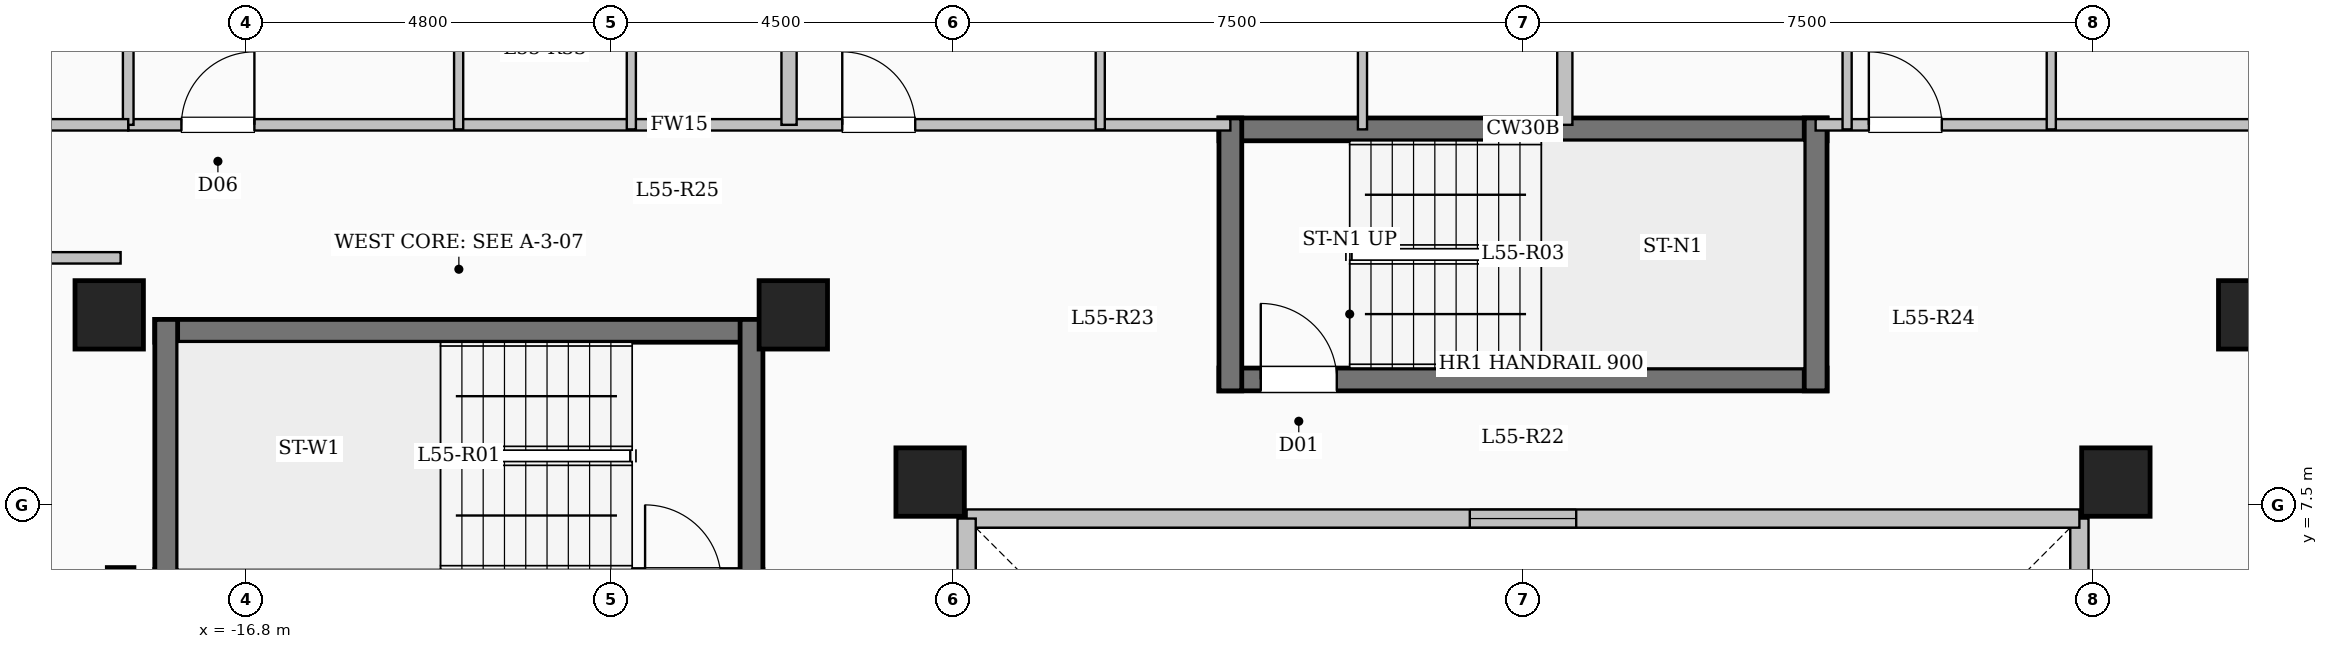
"""IFC4 building model, lengths in metres.
Left out: names, types, materials, properties, quantities, classifications, styles, units other than length and angle.
Written with IfcOpenShell. Run it as: python <this file> out.ifc"""

import sys

from ifc_helpers import new_model, si_unit, direction, frame, frame_2d, origin, origin_2d, place, context, subcontext, project, spatial, rectangle, extrude, element, fill, save


model = new_model("IFC4")
c1 = context("Model", 3, precision=1e-05, world=origin(), true_north=direction((0.0, 1.0)))
c2 = subcontext(c1, "Body", "Model", "MODEL_VIEW")
j1 = project(units=[si_unit("LENGTHUNIT", "METRE"), si_unit("PLANEANGLEUNIT", "RADIAN")], contexts=[c1])
p1 = place(None, origin())
s1 = spatial("IfcSite", under=j1, at=p1, CompositionType="ELEMENT")
p2 = place(p1, origin())
s2 = spatial("IfcBuilding", under=s1, at=p2, CompositionType="ELEMENT")
p3 = place(p2, frame((0.0, 0.0, 203.65)))
s3 = spatial("IfcBuildingStorey", under=s2, at=p3, CompositionType="ELEMENT", Elevation=203.65)
for number, where, z_axis, x_axis in (
    (1, (-7.8, 7.8, 0.0), (0.0, 0.0, 1.0), (1.0, 0.0, 0.0)),
    (2, (7.8, 7.8, 0.0), (0.0, 0.0, 1.0), (1.0, 0.0, 0.0)),
    (3, (-9.6, 10.0, 0.0), (0.0, 0.0, 1.0), (1.0, 0.0, 0.0)),
    (4, (9.6, 10.0, 0.0), (0.0, 0.0, 1.0), (1.0, 0.0, 0.0)),
    (5, (-18.6, 10.0, 0.0), (0.0, 0.0, 1.0), (1.0, 0.0, 0.0)),
):
    element("IfcColumn", number, at=place(p3, frame(where, z_axis=z_axis, x_axis=x_axis)), inside=s3, PredefinedType="COLUMN", context=c2, shape_type="SweptSolid", body=[
        extrude(rectangle(XDim=0.9, YDim=0.9, at=origin_2d()), origin(), (0.0, 0.0, 1.0), 3.35),
    ])
p4 = place(p3, frame((7.32, -7.32, 0.0), z_axis=(0.0, 0.0, 1.0), x_axis=(0.0, 1.0, 0.0)))
e6 = element("IfcWall", 6, at=p4, inside=s3, PredefinedType="SOLIDWALL", context=c2, shape_type="SweptSolid", body=[
    extrude(rectangle(XDim=14.64, YDim=0.24, at=frame_2d((7.32, 0.0))), origin(), (0.0, 0.0, 1.0), 3.1),
])
p5 = place(p4, frame((6.62, 0.0, 0.95)))
e7 = element("IfcOpeningElement", 7, at=p5, cuts=e6, PredefinedType="OPENING", context=c2, shape_type="SweptSolid", body=[
    extrude(rectangle(XDim=1.4, YDim=1.5, at=frame_2d((0.7, 0.75))), frame((0.0, 0.13, 0.0), z_axis=(0.0, -1.0, 0.0), x_axis=(1.0, 0.0, 0.0)), (0.0, 0.0, 1.0), 0.26),
])
p6 = place(p3, frame((7.32, 7.32, 0.0), z_axis=(0.0, 0.0, 1.0), x_axis=(-1.0, 0.0, 0.0)))
e8 = element("IfcWall", 8, at=p6, inside=s3, PredefinedType="SOLIDWALL", context=c2, shape_type="SweptSolid", body=[
    extrude(rectangle(XDim=14.64, YDim=0.24, at=frame_2d((7.32, 0.0))), origin(), (0.0, 0.0, 1.0), 3.1),
])
p7 = place(p6, frame((6.62, 0.0, 0.95)))
e9 = element("IfcOpeningElement", 9, at=p7, cuts=e8, PredefinedType="OPENING", context=c2, shape_type="SweptSolid", body=[
    extrude(rectangle(XDim=1.4, YDim=1.5, at=frame_2d((0.7, 0.75))), frame((0.0, 0.13, 0.0), z_axis=(0.0, -1.0, 0.0), x_axis=(1.0, 0.0, 0.0)), (0.0, 0.0, 1.0), 0.26),
])
p8 = place(p3, frame((-7.32, 7.32, 0.0), z_axis=(0.0, 0.0, 1.0), x_axis=(0.0, -1.0, 0.0)))
e10 = element("IfcWall", 10, at=p8, inside=s3, PredefinedType="SOLIDWALL", context=c2, shape_type="SweptSolid", body=[
    extrude(rectangle(XDim=14.64, YDim=0.24, at=frame_2d((7.32, 0.0))), origin(), (0.0, 0.0, 1.0), 3.1),
])
p9 = place(p8, frame((6.62, 0.0, 0.95)))
e11 = element("IfcOpeningElement", 11, at=p9, cuts=e10, PredefinedType="OPENING", context=c2, shape_type="SweptSolid", body=[
    extrude(rectangle(XDim=1.4, YDim=1.5, at=frame_2d((0.7, 0.75))), frame((0.0, 0.13, 0.0), z_axis=(0.0, -1.0, 0.0), x_axis=(1.0, 0.0, 0.0)), (0.0, 0.0, 1.0), 0.26),
])
p10 = place(p3, frame((-18.0, 9.79, 0.0), z_axis=(0.0, 0.0, 1.0), x_axis=(1.0, 0.0, 0.0)))
e12 = element("IfcWall", 12, at=p10, inside=s3, PredefinedType="SHEAR", context=c2, shape_type="SweptSolid", body=[
    extrude(rectangle(XDim=8.0, YDim=0.3, at=frame_2d((4.0, 0.0))), origin(), (0.0, 0.0, 1.0), 3.35),
])
p11 = place(p3, frame((-18.0, 6.5, 0.0), z_axis=(0.0, 0.0, 1.0), x_axis=(1.0, 0.0, 0.0)))
e13 = element("IfcWall", 13, at=p11, inside=s3, PredefinedType="SHEAR", context=c2, shape_type="SweptSolid", body=[
    extrude(rectangle(XDim=8.0, YDim=0.3, at=frame_2d((4.0, 0.0))), origin(), (0.0, 0.0, 1.0), 3.35),
])
p12 = place(p11, frame((6.45, 0.0, 0.0)))
e14 = element("IfcOpeningElement", 14, at=p12, cuts=e13, PredefinedType="OPENING", context=c2, shape_type="SweptSolid", body=[
    extrude(rectangle(XDim=1.0, YDim=2.15, at=frame_2d((0.5, 1.075))), frame((0.0, 0.16, 0.0), z_axis=(0.0, -1.0, 0.0), x_axis=(1.0, 0.0, 0.0)), (0.0, 0.0, 1.0), 0.32),
])
for number, where, z_axis, x_axis in (
    (15, (-17.85, 6.35, 0.0), (0.0, 0.0, 1.0), (0.0, 1.0, 0.0)),
    (16, (-10.15, 6.35, 0.0), (0.0, 0.0, 1.0), (0.0, 1.0, 0.0)),
):
    element("IfcWall", number, at=place(p3, frame(where, z_axis=z_axis, x_axis=x_axis)), inside=s3, PredefinedType="SHEAR", context=c2, shape_type="SweptSolid", body=[
        extrude(rectangle(XDim=3.59, YDim=0.3, at=frame_2d((1.795, 0.0))), origin(), (0.0, 0.0, 1.0), 3.35),
    ])
p13 = place(p3, frame((-4.0, 12.44, 0.0), z_axis=(0.0, 0.0, 1.0), x_axis=(1.0, 0.0, 0.0)))
e17 = element("IfcWall", 17, at=p13, inside=s3, PredefinedType="SHEAR", context=c2, shape_type="SweptSolid", body=[
    extrude(rectangle(XDim=8.0, YDim=0.3, at=frame_2d((4.0, 0.0))), origin(), (0.0, 0.0, 1.0), 3.35),
])
p14 = place(p3, frame((-4.0, 9.15, 0.0), z_axis=(0.0, 0.0, 1.0), x_axis=(1.0, 0.0, 0.0)))
e18 = element("IfcWall", 18, at=p14, inside=s3, PredefinedType="SHEAR", context=c2, shape_type="SweptSolid", body=[
    extrude(rectangle(XDim=8.0, YDim=0.3, at=frame_2d((4.0, 0.0))), origin(), (0.0, 0.0, 1.0), 3.35),
])
p15 = place(p14, frame((0.55, 0.0, 0.0)))
e19 = element("IfcOpeningElement", 19, at=p15, cuts=e18, PredefinedType="OPENING", context=c2, shape_type="SweptSolid", body=[
    extrude(rectangle(XDim=1.0, YDim=2.15, at=frame_2d((0.5, 1.075))), frame((0.0, 0.16, 0.0), z_axis=(0.0, -1.0, 0.0), x_axis=(1.0, 0.0, 0.0)), (0.0, 0.0, 1.0), 0.32),
])
for number, where, z_axis, x_axis in (
    (20, (-3.85, 9.0, 0.0), (0.0, 0.0, 1.0), (0.0, 1.0, 0.0)),
    (21, (3.85, 9.0, 0.0), (0.0, 0.0, 1.0), (0.0, 1.0, 0.0)),
):
    element("IfcWall", number, at=place(p3, frame(where, z_axis=z_axis, x_axis=x_axis)), inside=s3, PredefinedType="SHEAR", context=c2, shape_type="SweptSolid", body=[
        extrude(rectangle(XDim=3.59, YDim=0.3, at=frame_2d((1.795, 0.0))), origin(), (0.0, 0.0, 1.0), 3.35),
    ])
p16 = place(p3, frame((-18.45, -7.375, 0.0), z_axis=(0.0, 0.0, 1.0), x_axis=(0.0, 1.0, 0.0)))
e22 = element("IfcWall", 22, at=p16, inside=s3, PredefinedType="SHEAR", context=c2, shape_type="SweptSolid", body=[
    extrude(rectangle(XDim=14.05, YDim=0.35, at=frame_2d((7.025, 0.0))), origin(), (0.0, 0.0, 1.0), 3.35),
])
p17 = place(p3, frame((-18.35, 12.5, 0.0), z_axis=(0.0, 0.0, 1.0), x_axis=(1.0, 0.0, 0.0)))
e23 = element("IfcWall", 23, at=p17, inside=s3, PredefinedType="PARTITIONING", context=c2, shape_type="SweptSolid", body=[
    extrude(rectangle(XDim=14.5, YDim=0.15, at=frame_2d((7.25, 0.0))), origin(), (0.0, 0.0, 1.0), 3.1),
])
p18 = place(p17, frame((0.7, 0.0, 0.0)))
e24 = element("IfcOpeningElement", 24, at=p18, cuts=e23, PredefinedType="OPENING", context=c2, shape_type="SweptSolid", body=[
    extrude(rectangle(XDim=0.96, YDim=2.15, at=frame_2d((0.48, 1.075))), frame((0.0, 0.085, 0.0), z_axis=(0.0, -1.0, 0.0), x_axis=(1.0, 0.0, 0.0)), (0.0, 0.0, 1.0), 0.17),
])
p19 = place(p17, frame((9.394, 0.0, 0.0)))
e25 = element("IfcOpeningElement", 25, at=p19, cuts=e23, PredefinedType="OPENING", context=c2, shape_type="SweptSolid", body=[
    extrude(rectangle(XDim=0.96, YDim=2.15, at=frame_2d((0.48, 1.075))), frame((0.0, 0.085, 0.0), z_axis=(0.0, -1.0, 0.0), x_axis=(1.0, 0.0, 0.0)), (0.0, 0.0, 1.0), 0.17),
])
p20 = place(p3, frame((3.85, 12.5, 0.0), z_axis=(0.0, 0.0, 1.0), x_axis=(1.0, 0.0, 0.0)))
e26 = element("IfcWall", 26, at=p20, inside=s3, PredefinedType="PARTITIONING", context=c2, shape_type="SweptSolid", body=[
    extrude(rectangle(XDim=14.5, YDim=0.15, at=frame_2d((7.25, 0.0))), origin(), (0.0, 0.0, 1.0), 3.1),
])
p21 = place(p20, frame((0.7, 0.0, 0.0)))
e27 = element("IfcOpeningElement", 27, at=p21, cuts=e26, PredefinedType="OPENING", context=c2, shape_type="SweptSolid", body=[
    extrude(rectangle(XDim=0.96, YDim=2.15, at=frame_2d((0.48, 1.075))), frame((0.0, 0.085, 0.0), z_axis=(0.0, -1.0, 0.0), x_axis=(1.0, 0.0, 0.0)), (0.0, 0.0, 1.0), 0.17),
])
p22 = place(p20, frame((6.656, 0.0, 0.0)))
e28 = element("IfcOpeningElement", 28, at=p22, cuts=e26, PredefinedType="OPENING", context=c2, shape_type="SweptSolid", body=[
    extrude(rectangle(XDim=0.96, YDim=2.15, at=frame_2d((0.48, 1.075))), frame((0.0, 0.085, 0.0), z_axis=(0.0, -1.0, 0.0), x_axis=(1.0, 0.0, 0.0)), (0.0, 0.0, 1.0), 0.17),
])
p23 = place(p3, frame((0.55, 12.5, 0.0), z_axis=(0.0, 0.0, 1.0), x_axis=(0.0, 1.0, 0.0)))
e29 = element("IfcWall", 29, at=p23, inside=s3, PredefinedType="SOLIDWALL", context=c2, shape_type="SweptSolid", body=[
    extrude(rectangle(XDim=9.88, YDim=0.2, at=frame_2d((4.94, 0.0))), origin(), (0.0, 0.0, 1.0), 3.1),
])
p24 = place(p3, frame((-9.656, 12.5, 0.0), z_axis=(0.0, 0.0, 1.0), x_axis=(0.0, 1.0, 0.0)))
e30 = element("IfcWall", 30, at=p24, inside=s3, PredefinedType="SOLIDWALL", context=c2, shape_type="SweptSolid", body=[
    extrude(rectangle(XDim=8.732, YDim=0.2, at=frame_2d((4.366, 0.0))), origin(), (0.0, 0.0, 1.0), 3.1),
])
p25 = place(p3, frame((-14.003, 12.44, 0.0), z_axis=(0.0, 0.0, 1.0), x_axis=(0.0, 1.0, 0.0)))
e31 = element("IfcWall", 31, at=p25, inside=s3, PredefinedType="PARTITIONING", context=c2, shape_type="SweptSolid", body=[
    extrude(rectangle(XDim=8.46, YDim=0.12, at=frame_2d((4.23, 0.0))), origin(), (0.0, 0.0, 1.0), 3.1),
])
p26 = place(p25, frame((2.905, 0.0, 0.0)))
e32 = element("IfcOpeningElement", 32, at=p26, cuts=e31, PredefinedType="OPENING", context=c2, shape_type="SweptSolid", body=[
    extrude(rectangle(XDim=1.08, YDim=2.15, at=frame_2d((0.54, 1.075))), frame((0.0, 0.07, 0.0), z_axis=(0.0, -1.0, 0.0), x_axis=(1.0, 0.0, 0.0)), (0.0, 0.0, 1.0), 0.14),
])
p27 = place(p3, frame((-11.731, 12.44, 0.0), z_axis=(0.0, 0.0, 1.0), x_axis=(0.0, 1.0, 0.0)))
e33 = element("IfcWall", 33, at=p27, inside=s3, PredefinedType="PARTITIONING", context=c2, shape_type="SweptSolid", body=[
    extrude(rectangle(XDim=2.62, YDim=0.12, at=frame_2d((1.31, 0.0))), origin(), (0.0, 0.0, 1.0), 3.1),
])
p28 = place(p3, frame((-5.562, 12.44, 0.0), z_axis=(0.0, 0.0, 1.0), x_axis=(0.0, 1.0, 0.0)))
e34 = element("IfcWall", 34, at=p28, inside=s3, PredefinedType="PARTITIONING", context=c2, shape_type="SweptSolid", body=[
    extrude(rectangle(XDim=9.801, YDim=0.12, at=frame_2d((4.9, 0.0))), origin(), (0.0, 0.0, 1.0), 3.1),
])
p29 = place(p28, frame((3.075, 0.0, 0.0)))
e35 = element("IfcOpeningElement", 35, at=p29, cuts=e34, PredefinedType="OPENING", context=c2, shape_type="SweptSolid", body=[
    extrude(rectangle(XDim=1.08, YDim=2.15, at=frame_2d((0.54, 1.075))), frame((0.0, 0.07, 0.0), z_axis=(0.0, -1.0, 0.0), x_axis=(1.0, 0.0, 0.0)), (0.0, 0.0, 1.0), 0.14),
])
p30 = place(p3, frame((-2.112, 12.44, 0.0), z_axis=(0.0, 0.0, 1.0), x_axis=(0.0, 1.0, 0.0)))
e36 = element("IfcWall", 36, at=p30, inside=s3, PredefinedType="PARTITIONING", context=c2, shape_type="SweptSolid", body=[
    extrude(rectangle(XDim=2.79, YDim=0.12, at=frame_2d((1.395, 0.0))), origin(), (0.0, 0.0, 1.0), 3.1),
])
p31 = place(p3, frame((4.264, 12.44, 0.0), z_axis=(0.0, 0.0, 1.0), x_axis=(0.0, 1.0, 0.0)))
e37 = element("IfcWall", 37, at=p31, inside=s3, PredefinedType="PARTITIONING", context=c2, shape_type="SweptSolid", body=[
    extrude(rectangle(XDim=9.94, YDim=0.12, at=frame_2d((4.97, 0.0))), origin(), (0.0, 0.0, 1.0), 3.1),
])
p32 = place(p31, frame((3.245, 0.0, 0.0)))
e38 = element("IfcOpeningElement", 38, at=p32, cuts=e37, PredefinedType="OPENING", context=c2, shape_type="SweptSolid", body=[
    extrude(rectangle(XDim=1.08, YDim=2.15, at=frame_2d((0.54, 1.075))), frame((0.0, 0.07, 0.0), z_axis=(0.0, -1.0, 0.0), x_axis=(1.0, 0.0, 0.0)), (0.0, 0.0, 1.0), 0.14),
])
p33 = place(p3, frame((6.95, 12.44, 0.0), z_axis=(0.0, 0.0, 1.0), x_axis=(0.0, 1.0, 0.0)))
e39 = element("IfcWall", 39, at=p33, inside=s3, PredefinedType="PARTITIONING", context=c2, shape_type="SweptSolid", body=[
    extrude(rectangle(XDim=2.96, YDim=0.12, at=frame_2d((1.48, 0.0))), origin(), (0.0, 0.0, 1.0), 3.1),
])
p34 = place(p3, frame((-23.58, 10.75, 0.0), z_axis=(0.0, 0.0, 1.0), x_axis=(1.0, 0.0, 0.0)))
e40 = element("IfcWall", 40, at=p34, inside=s3, PredefinedType="PARTITIONING", context=c2, shape_type="SweptSolid", body=[
    extrude(rectangle(XDim=5.13, YDim=0.15, at=frame_2d((2.565, 0.0))), origin(), (0.0, 0.0, 1.0), 3.1),
])
p35 = place(p3, frame((-18.35, 12.5, 0.0), z_axis=(0.0, 0.0, 1.0), x_axis=(0.0, 1.0, 0.0)))
e41 = element("IfcWall", 41, at=p35, inside=s3, PredefinedType="PARTITIONING", context=c2, shape_type="SweptSolid", body=[
    extrude(rectangle(XDim=4.75, YDim=0.14, at=frame_2d((2.375, 0.0))), origin(), (0.0, 0.0, 1.0), 3.1),
])
p36 = place(p3, frame((-23.58, 12.5, 0.0), z_axis=(0.0, 0.0, 1.0), x_axis=(1.0, 0.0, 0.0)))
e42 = element("IfcWall", 42, at=p36, inside=s3, PredefinedType="PARTITIONING", context=c2, shape_type="SweptSolid", body=[
    extrude(rectangle(XDim=5.23, YDim=0.15, at=frame_2d((2.615, 0.0))), origin(), (0.0, 0.0, 1.0), 3.1),
])
p37 = place(p36, frame((2.14, 0.0, 0.0)))
e43 = element("IfcOpeningElement", 43, at=p37, cuts=e42, PredefinedType="OPENING", context=c2, shape_type="SweptSolid", body=[
    extrude(rectangle(XDim=0.95, YDim=2.15, at=frame_2d((0.475, 1.075))), frame((0.0, 0.085, 0.0), z_axis=(0.0, -1.0, 0.0), x_axis=(1.0, 0.0, 0.0)), (0.0, 0.0, 1.0), 0.17),
])
p38 = place(p7, origin())
e44 = element("IfcWindow", 44, at=p38, inside=s3, PartitioningType="SINGLE_PANEL", PredefinedType="WINDOW", context=c2, shape_type="SweptSolid", body=[
    extrude(rectangle(XDim=1.4, YDim=1.5, at=frame_2d((0.7, 0.75))), frame((0.0, 0.03, 0.0), z_axis=(0.0, -1.0, 0.0), x_axis=(1.0, 0.0, 0.0)), (0.0, 0.0, 1.0), 0.06),
])
fill(e9, e44)
p39 = place(p15, origin())
e45 = element("IfcDoor", 45, at=p39, inside=s3, OperationType="SINGLE_SWING_LEFT", PredefinedType="DOOR", context=c2, shape_type="SweptSolid", body=[
    extrude(rectangle(XDim=1.0, YDim=2.15, at=frame_2d((0.5, 1.075))), frame((0.0, 0.025, 0.0), z_axis=(0.0, -1.0, 0.0), x_axis=(1.0, 0.0, 0.0)), (0.0, 0.0, 1.0), 0.05),
])
fill(e19, e45)
p40 = place(p18, origin())
e46 = element("IfcDoor", 46, at=p40, inside=s3, OperationType="SINGLE_SWING_RIGHT", PredefinedType="DOOR", context=c2, shape_type="SweptSolid", body=[
    extrude(rectangle(XDim=0.96, YDim=2.15, at=frame_2d((0.48, 1.075))), frame((0.0, 0.025, 0.0), z_axis=(0.0, -1.0, 0.0), x_axis=(1.0, 0.0, 0.0)), (0.0, 0.0, 1.0), 0.05),
])
fill(e24, e46)
p41 = place(p19, origin())
e47 = element("IfcDoor", 47, at=p41, inside=s3, OperationType="SINGLE_SWING_LEFT", PredefinedType="DOOR", context=c2, shape_type="SweptSolid", body=[
    extrude(rectangle(XDim=0.96, YDim=2.15, at=frame_2d((0.48, 1.075))), frame((0.0, 0.025, 0.0), z_axis=(0.0, -1.0, 0.0), x_axis=(1.0, 0.0, 0.0)), (0.0, 0.0, 1.0), 0.05),
])
fill(e25, e47)
p42 = place(p21, origin())
e48 = element("IfcDoor", 48, at=p42, inside=s3, OperationType="SINGLE_SWING_LEFT", PredefinedType="DOOR", context=c2, shape_type="SweptSolid", body=[
    extrude(rectangle(XDim=0.96, YDim=2.15, at=frame_2d((0.48, 1.075))), frame((0.0, 0.025, 0.0), z_axis=(0.0, -1.0, 0.0), x_axis=(1.0, 0.0, 0.0)), (0.0, 0.0, 1.0), 0.05),
])
fill(e27, e48)
save(model, sys.argv[1])
